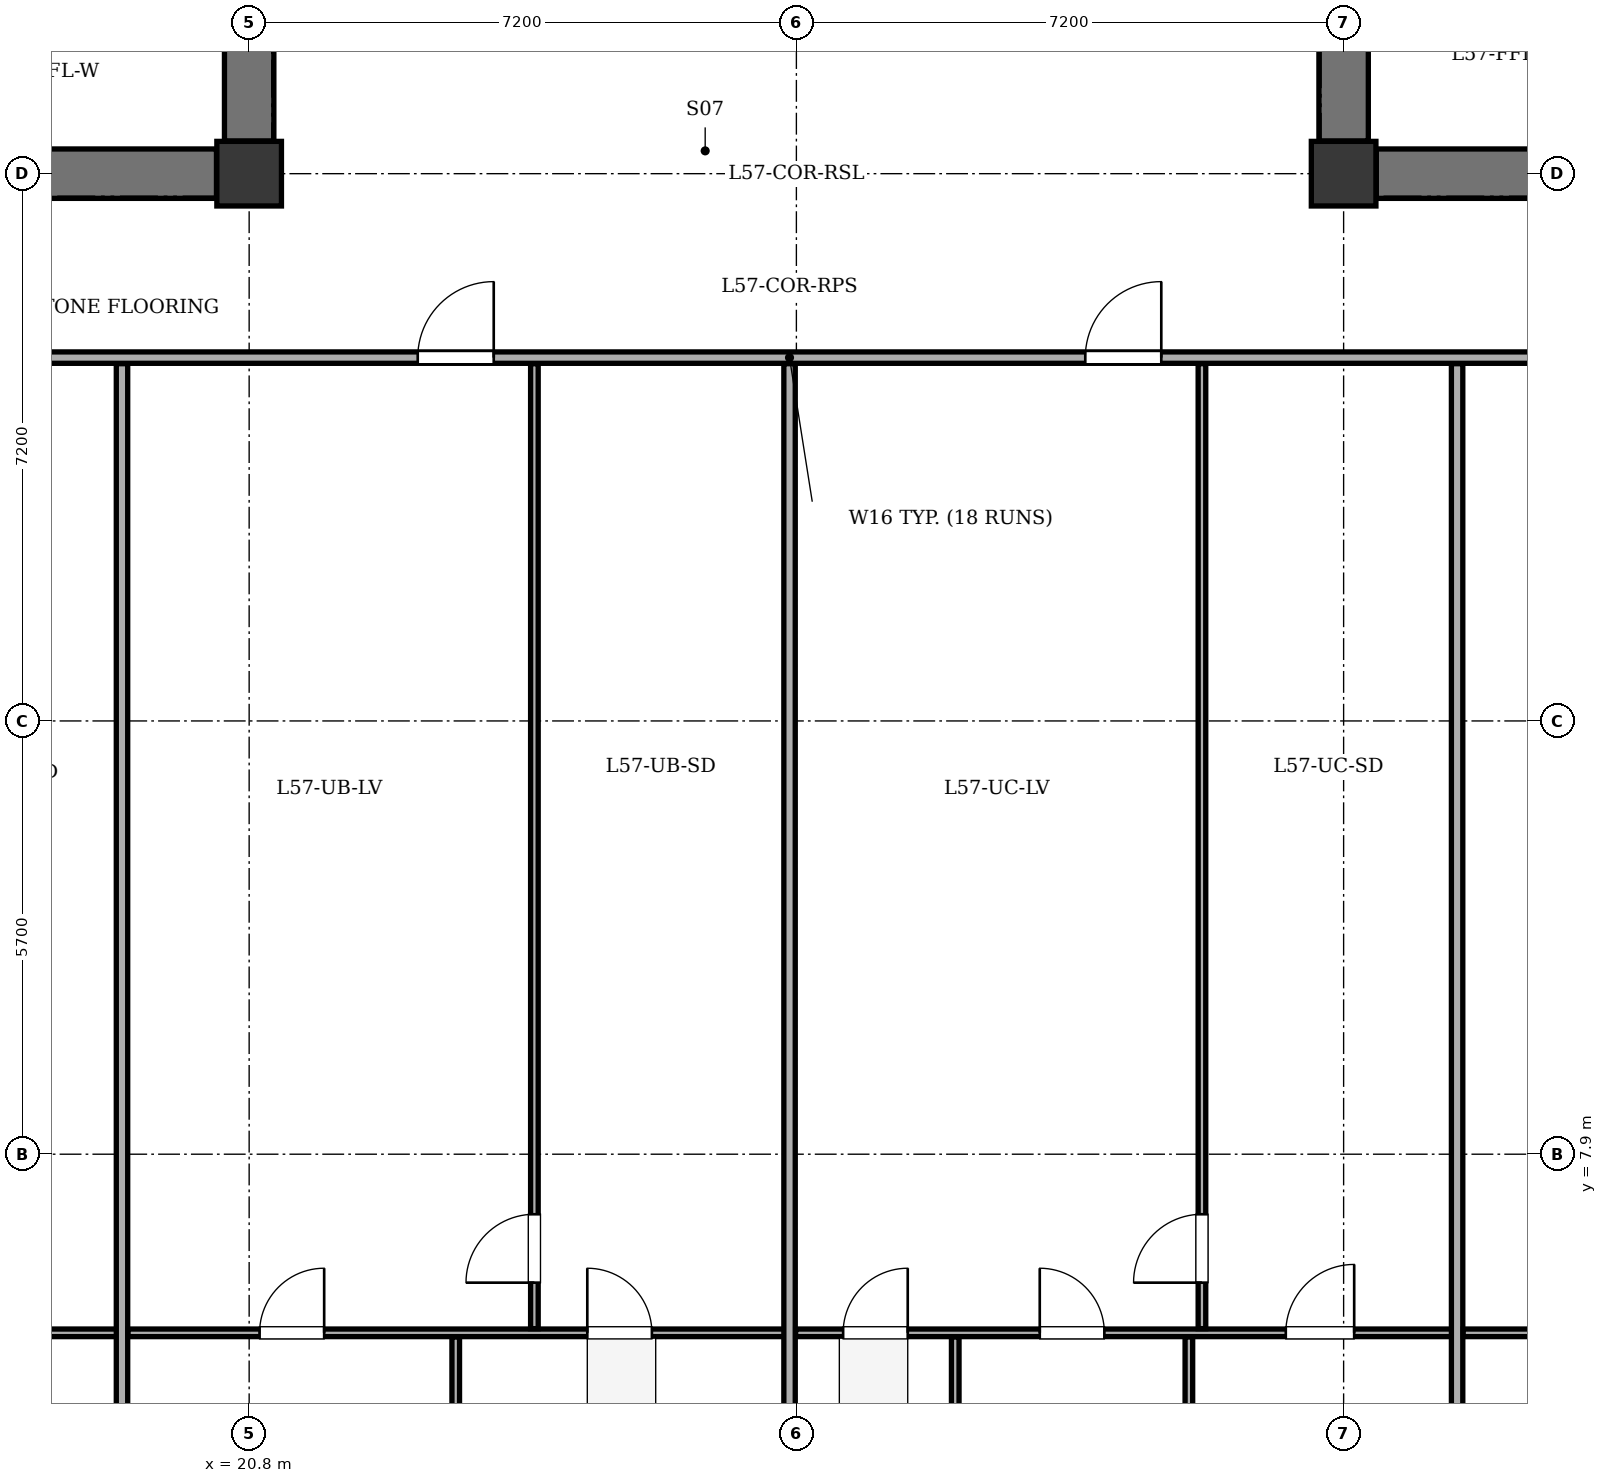
"""IFC4 building model, lengths in metres.
Left out: names, types, materials, properties, quantities, classifications, styles, units other than length and angle.
Written with IfcOpenShell. Run it as: python <this file> out.ifc"""

import sys

from ifc_helpers import new_model, si_unit, direction, frame, frame_2d, origin, origin_2d, place, context, subcontext, project, spatial, rectangle, extrude, element, fill, save


model = new_model("IFC4")
c1 = context("Model", 3, precision=1e-05, world=origin(), true_north=direction((0.0, 1.0)))
c2 = subcontext(c1, "Body", "Model", "MODEL_VIEW")
j1 = project(units=[si_unit("LENGTHUNIT", "METRE"), si_unit("PLANEANGLEUNIT", "RADIAN")], contexts=[c1])
p1 = place(None, origin())
s1 = spatial("IfcSite", under=j1, at=p1, CompositionType="ELEMENT")
p2 = place(p1, origin())
s2 = spatial("IfcBuilding", under=s1, at=p2, CompositionType="ELEMENT")
p3 = place(p2, frame((0.0, 0.0, 221.1)))
s3 = spatial("IfcBuildingStorey", under=s2, at=p3, CompositionType="ELEMENT", Elevation=221.1)
for number, where, z_axis, x_axis in (
    (1, (20.8, 20.8, 0.0), (0.0, 0.0, 1.0), (1.0, 0.0, 0.0)),
    (2, (35.2, 20.8, 0.0), (0.0, 0.0, 1.0), (1.0, 0.0, 0.0)),
):
    element("IfcColumn", number, at=place(p3, frame(where, z_axis=z_axis, x_axis=x_axis)), inside=s3, PredefinedType="COLUMN", context=c2, shape_type="SweptSolid", body=[
        extrude(rectangle(XDim=0.85, YDim=0.85, at=origin_2d()), origin(), (0.0, 0.0, 1.0), 3.4),
    ])
p4 = place(p3, frame((13.23, 20.8, 0.0), z_axis=(0.0, 0.0, 1.0), x_axis=(1.0, 0.0, 0.0)))
e3 = element("IfcWall", 3, at=p4, inside=s3, PredefinedType="SHEAR", context=c2, shape_type="SweptSolid", body=[
    extrude(rectangle(XDim=7.14, YDim=0.65, at=frame_2d((3.57, 0.0))), origin(), (0.0, 0.0, 1.0), 3.1),
])
p5 = place(p3, frame((20.8, 21.23, 0.0), z_axis=(0.0, 0.0, 1.0), x_axis=(0.0, 1.0, 0.0)))
e4 = element("IfcWall", 4, at=p5, inside=s3, PredefinedType="SHEAR", context=c2, shape_type="SweptSolid", body=[
    extrude(rectangle(XDim=3.82, YDim=0.65, at=frame_2d((1.91, 0.0))), origin(), (0.0, 0.0, 1.0), 3.1),
])
p6 = place(p5, frame((1.37, 0.0, 0.0)))
e5 = element("IfcOpeningElement", 5, at=p6, cuts=e4, PredefinedType="OPENING", context=c2, shape_type="SweptSolid", body=[
    extrude(rectangle(XDim=1.2, YDim=2.15, at=frame_2d((0.6, 1.075))), frame((0.0, 0.335, 0.0), z_axis=(0.0, -1.0, 0.0), x_axis=(1.0, 0.0, 0.0)), (0.0, 0.0, 1.0), 0.67),
])
p7 = place(p3, frame((35.63, 20.8, 0.0), z_axis=(0.0, 0.0, 1.0), x_axis=(1.0, 0.0, 0.0)))
e6 = element("IfcWall", 6, at=p7, inside=s3, PredefinedType="SHEAR", context=c2, shape_type="SweptSolid", body=[
    extrude(rectangle(XDim=7.14, YDim=0.65, at=frame_2d((3.57, 0.0))), origin(), (0.0, 0.0, 1.0), 3.1),
])
p8 = place(p3, frame((35.2, 21.23, 0.0), z_axis=(0.0, 0.0, 1.0), x_axis=(0.0, 1.0, 0.0)))
e7 = element("IfcWall", 7, at=p8, inside=s3, PredefinedType="SHEAR", context=c2, shape_type="SweptSolid", body=[
    extrude(rectangle(XDim=3.82, YDim=0.65, at=frame_2d((1.91, 0.0))), origin(), (0.0, 0.0, 1.0), 3.1),
])
p9 = place(p8, frame((1.37, 0.0, 0.0)))
e8 = element("IfcOpeningElement", 8, at=p9, cuts=e7, PredefinedType="OPENING", context=c2, shape_type="SweptSolid", body=[
    extrude(rectangle(XDim=1.2, YDim=2.15, at=frame_2d((0.6, 1.075))), frame((0.0, 0.335, 0.0), z_axis=(0.0, -1.0, 0.0), x_axis=(1.0, 0.0, 0.0)), (0.0, 0.0, 1.0), 0.67),
])
p10 = place(p3, frame((10.9, 18.38, 0.0), z_axis=(0.0, 0.0, 1.0), x_axis=(1.0, 0.0, 0.0)))
e9 = element("IfcWall", 9, at=p10, inside=s3, PredefinedType="PARTITIONING", context=c2, shape_type="SweptSolid", body=[
    extrude(rectangle(XDim=34.02, YDim=0.15, at=frame_2d((17.01, 0.0))), origin(), (0.0, 0.0, 1.0), 3.1),
])
p11 = place(p10, frame((3.674, 0.0, 0.0)))
e10 = element("IfcOpeningElement", 10, at=p11, cuts=e9, PredefinedType="OPENING", context=c2, shape_type="SweptSolid", body=[
    extrude(rectangle(XDim=1.0, YDim=2.1, at=frame_2d((0.5, 1.05))), frame((0.0, 0.085, 0.0), z_axis=(0.0, -1.0, 0.0), x_axis=(1.0, 0.0, 0.0)), (0.0, 0.0, 1.0), 0.17),
])
p12 = place(p10, frame((12.118, 0.0, 0.0)))
e11 = element("IfcOpeningElement", 11, at=p12, cuts=e9, PredefinedType="OPENING", context=c2, shape_type="SweptSolid", body=[
    extrude(rectangle(XDim=1.0, YDim=2.1, at=frame_2d((0.5, 1.05))), frame((0.0, 0.085, 0.0), z_axis=(0.0, -1.0, 0.0), x_axis=(1.0, 0.0, 0.0)), (0.0, 0.0, 1.0), 0.17),
])
p13 = place(p10, frame((20.901, 0.0, 0.0)))
e12 = element("IfcOpeningElement", 12, at=p13, cuts=e9, PredefinedType="OPENING", context=c2, shape_type="SweptSolid", body=[
    extrude(rectangle(XDim=1.0, YDim=2.1, at=frame_2d((0.5, 1.05))), frame((0.0, 0.085, 0.0), z_axis=(0.0, -1.0, 0.0), x_axis=(1.0, 0.0, 0.0)), (0.0, 0.0, 1.0), 0.17),
])
p14 = place(p10, frame((29.346, 0.0, 0.0)))
e13 = element("IfcOpeningElement", 13, at=p14, cuts=e9, PredefinedType="OPENING", context=c2, shape_type="SweptSolid", body=[
    extrude(rectangle(XDim=1.0, YDim=2.1, at=frame_2d((0.5, 1.05))), frame((0.0, 0.085, 0.0), z_axis=(0.0, -1.0, 0.0), x_axis=(1.0, 0.0, 0.0)), (0.0, 0.0, 1.0), 0.17),
])
p15 = place(p3, frame((11.1, 5.55, 0.0), z_axis=(0.0, 0.0, 1.0), x_axis=(1.0, 0.0, 0.0)))
e14 = element("IfcWall", 14, at=p15, inside=s3, PredefinedType="PARTITIONING", context=c2, shape_type="SweptSolid", body=[
    extrude(rectangle(XDim=8.067, YDim=0.1, at=frame_2d((4.033, 0.0))), origin(), (0.0, 0.0, 1.0), 3.1),
])
p16 = place(p15, frame((1.562, 0.0, 0.0)))
e15 = element("IfcOpeningElement", 15, at=p16, cuts=e14, PredefinedType="OPENING", context=c2, shape_type="SweptSolid", body=[
    extrude(rectangle(XDim=0.85, YDim=2.05, at=frame_2d((0.425, 1.025))), frame((0.0, 0.06, 0.0), z_axis=(0.0, -1.0, 0.0), x_axis=(1.0, 0.0, 0.0)), (0.0, 0.0, 1.0), 0.12),
])
p17 = place(p15, frame((5.535, 0.0, 0.0)))
e16 = element("IfcOpeningElement", 16, at=p17, cuts=e14, PredefinedType="OPENING", context=c2, shape_type="SweptSolid", body=[
    extrude(rectangle(XDim=0.85, YDim=2.05, at=frame_2d((0.425, 1.025))), frame((0.0, 0.06, 0.0), z_axis=(0.0, -1.0, 0.0), x_axis=(1.0, 0.0, 0.0)), (0.0, 0.0, 1.0), 0.12),
])
p18 = place(p3, frame((19.127, 3.045, 0.0), z_axis=(0.0, 0.0, 1.0), x_axis=(0.0, 1.0, 0.0)))
e17 = element("IfcWall", 17, at=p18, inside=s3, PredefinedType="PARTITIONING", context=c2, shape_type="SweptSolid", body=[
    extrude(rectangle(XDim=15.255, YDim=0.15, at=frame_2d((7.627, 0.0))), origin(), (0.0, 0.0, 1.0), 3.1),
])
p19 = place(p3, frame((19.207, 5.55, 0.0), z_axis=(0.0, 0.0, 1.0), x_axis=(1.0, 0.0, 0.0)))
e18 = element("IfcWall", 18, at=p19, inside=s3, PredefinedType="PARTITIONING", context=c2, shape_type="SweptSolid", body=[
    extrude(rectangle(XDim=8.743, YDim=0.1, at=frame_2d((4.372, 0.0))), origin(), (0.0, 0.0, 1.0), 3.1),
])
p20 = place(p19, frame((1.73, 0.0, 0.0)))
e19 = element("IfcOpeningElement", 19, at=p20, cuts=e18, PredefinedType="OPENING", context=c2, shape_type="SweptSolid", body=[
    extrude(rectangle(XDim=0.85, YDim=2.05, at=frame_2d((0.425, 1.025))), frame((0.0, 0.06, 0.0), z_axis=(0.0, -1.0, 0.0), x_axis=(1.0, 0.0, 0.0)), (0.0, 0.0, 1.0), 0.12),
])
p21 = place(p19, frame((6.042, 0.0, 0.0)))
e20 = element("IfcOpeningElement", 20, at=p21, cuts=e18, PredefinedType="OPENING", context=c2, shape_type="SweptSolid", body=[
    extrude(rectangle(XDim=0.85, YDim=2.05, at=frame_2d((0.425, 1.025))), frame((0.0, 0.06, 0.0), z_axis=(0.0, -1.0, 0.0), x_axis=(1.0, 0.0, 0.0)), (0.0, 0.0, 1.0), 0.12),
])
p22 = place(p3, frame((24.553, 5.605, 0.0), z_axis=(0.0, 0.0, 1.0), x_axis=(0.0, 1.0, 0.0)))
e21 = element("IfcWall", 21, at=p22, inside=s3, PredefinedType="PARTITIONING", context=c2, shape_type="SweptSolid", body=[
    extrude(rectangle(XDim=12.695, YDim=0.1, at=frame_2d((6.348, 0.0))), origin(), (0.0, 0.0, 1.0), 3.1),
])
p23 = place(p22, frame((0.605, 0.0, 0.0)))
e22 = element("IfcOpeningElement", 22, at=p23, cuts=e21, PredefinedType="OPENING", context=c2, shape_type="SweptSolid", body=[
    extrude(rectangle(XDim=0.9, YDim=2.05, at=frame_2d((0.45, 1.025))), frame((0.0, 0.06, 0.0), z_axis=(0.0, -1.0, 0.0), x_axis=(1.0, 0.0, 0.0)), (0.0, 0.0, 1.0), 0.12),
])
p24 = place(p3, frame((23.518, 3.045, 0.0), z_axis=(0.0, 0.0, 1.0), x_axis=(0.0, 1.0, 0.0)))
e23 = element("IfcWall", 23, at=p24, inside=s3, PredefinedType="PARTITIONING", context=c2, shape_type="SweptSolid", body=[
    extrude(rectangle(XDim=2.45, YDim=0.1, at=frame_2d((1.225, 0.0))), origin(), (0.0, 0.0, 1.0), 3.1),
])
p25 = place(p3, frame((27.91, 3.045, 0.0), z_axis=(0.0, 0.0, 1.0), x_axis=(0.0, 1.0, 0.0)))
e24 = element("IfcWall", 24, at=p25, inside=s3, PredefinedType="PARTITIONING", context=c2, shape_type="SweptSolid", body=[
    extrude(rectangle(XDim=15.255, YDim=0.15, at=frame_2d((7.627, 0.0))), origin(), (0.0, 0.0, 1.0), 2.535),
])
p26 = place(p3, frame((27.99, 5.55, 0.0), z_axis=(0.0, 0.0, 1.0), x_axis=(1.0, 0.0, 0.0)))
e25 = element("IfcWall", 25, at=p26, inside=s3, PredefinedType="PARTITIONING", context=c2, shape_type="SweptSolid", body=[
    extrude(rectangle(XDim=8.743, YDim=0.1, at=frame_2d((4.372, 0.0))), origin(), (0.0, 0.0, 1.0), 3.1),
])
p27 = place(p26, frame((0.625, 0.0, 0.0)))
e26 = element("IfcOpeningElement", 26, at=p27, cuts=e25, PredefinedType="OPENING", context=c2, shape_type="SweptSolid", body=[
    extrude(rectangle(XDim=0.85, YDim=2.05, at=frame_2d((0.425, 1.025))), frame((0.0, 0.06, 0.0), z_axis=(0.0, -1.0, 0.0), x_axis=(1.0, 0.0, 0.0)), (0.0, 0.0, 1.0), 0.12),
])
p28 = place(p26, frame((3.212, 0.0, 0.0)))
e27 = element("IfcOpeningElement", 27, at=p28, cuts=e25, PredefinedType="OPENING", context=c2, shape_type="SweptSolid", body=[
    extrude(rectangle(XDim=0.85, YDim=2.05, at=frame_2d((0.425, 1.025))), frame((0.0, 0.06, 0.0), z_axis=(0.0, -1.0, 0.0), x_axis=(1.0, 0.0, 0.0)), (0.0, 0.0, 1.0), 0.12),
])
p29 = place(p26, frame((6.449, 0.0, 0.0)))
e28 = element("IfcOpeningElement", 28, at=p29, cuts=e25, PredefinedType="OPENING", context=c2, shape_type="SweptSolid", body=[
    extrude(rectangle(XDim=0.9, YDim=2.05, at=frame_2d((0.45, 1.025))), frame((0.0, 0.06, 0.0), z_axis=(0.0, -1.0, 0.0), x_axis=(1.0, 0.0, 0.0)), (0.0, 0.0, 1.0), 0.12),
])
p30 = place(p3, frame((33.336, 5.605, 0.0), z_axis=(0.0, 0.0, 1.0), x_axis=(0.0, 1.0, 0.0)))
e29 = element("IfcWall", 29, at=p30, inside=s3, PredefinedType="PARTITIONING", context=c2, shape_type="SweptSolid", body=[
    extrude(rectangle(XDim=12.695, YDim=0.1, at=frame_2d((6.348, 0.0))), origin(), (0.0, 0.0, 1.0), 3.1),
])
p31 = place(p30, frame((0.605, 0.0, 0.0)))
e30 = element("IfcOpeningElement", 30, at=p31, cuts=e29, PredefinedType="OPENING", context=c2, shape_type="SweptSolid", body=[
    extrude(rectangle(XDim=0.9, YDim=2.05, at=frame_2d((0.45, 1.025))), frame((0.0, 0.06, 0.0), z_axis=(0.0, -1.0, 0.0), x_axis=(1.0, 0.0, 0.0)), (0.0, 0.0, 1.0), 0.12),
])
for number, where, z_axis, x_axis in (
    (31, (30.09, 3.045, 0.0), (0.0, 0.0, 1.0), (0.0, 1.0, 0.0)),
    (32, (33.164, 3.045, 0.0), (0.0, 0.0, 1.0), (0.0, 1.0, 0.0)),
):
    element("IfcWall", number, at=place(p3, frame(where, z_axis=z_axis, x_axis=x_axis)), inside=s3, PredefinedType="PARTITIONING", context=c2, shape_type="SweptSolid", body=[
        extrude(rectangle(XDim=2.45, YDim=0.1, at=frame_2d((1.225, 0.0))), origin(), (0.0, 0.0, 1.0), 3.1),
    ])
p32 = place(p3, frame((36.693, 3.045, 0.0), z_axis=(0.0, 0.0, 1.0), x_axis=(0.0, 1.0, 0.0)))
e33 = element("IfcWall", 33, at=p32, inside=s3, PredefinedType="PARTITIONING", context=c2, shape_type="SweptSolid", body=[
    extrude(rectangle(XDim=15.255, YDim=0.15, at=frame_2d((7.627, 0.0))), origin(), (0.0, 0.0, 1.0), 2.725),
])
p33 = place(p3, frame((36.773, 5.55, 0.0), z_axis=(0.0, 0.0, 1.0), x_axis=(1.0, 0.0, 0.0)))
e34 = element("IfcWall", 34, at=p33, inside=s3, PredefinedType="PARTITIONING", context=c2, shape_type="SweptSolid", body=[
    extrude(rectangle(XDim=8.067, YDim=0.1, at=frame_2d((4.034, 0.0))), origin(), (0.0, 0.0, 1.0), 3.1),
])
p34 = place(p33, frame((1.561, 0.0, 0.0)))
e35 = element("IfcOpeningElement", 35, at=p34, cuts=e34, PredefinedType="OPENING", context=c2, shape_type="SweptSolid", body=[
    extrude(rectangle(XDim=0.85, YDim=2.05, at=frame_2d((0.425, 1.025))), frame((0.0, 0.06, 0.0), z_axis=(0.0, -1.0, 0.0), x_axis=(1.0, 0.0, 0.0)), (0.0, 0.0, 1.0), 0.12),
])
p35 = place(p33, frame((5.535, 0.0, 0.0)))
e36 = element("IfcOpeningElement", 36, at=p35, cuts=e34, PredefinedType="OPENING", context=c2, shape_type="SweptSolid", body=[
    extrude(rectangle(XDim=0.85, YDim=2.05, at=frame_2d((0.425, 1.025))), frame((0.0, 0.06, 0.0), z_axis=(0.0, -1.0, 0.0), x_axis=(1.0, 0.0, 0.0)), (0.0, 0.0, 1.0), 0.12),
])
p36 = place(p12, origin())
e37 = element("IfcDoor", 37, at=p36, inside=s3, OperationType="SINGLE_SWING_RIGHT", PredefinedType="DOOR", context=c2, shape_type="SweptSolid", body=[
    extrude(rectangle(XDim=1.0, YDim=2.1, at=frame_2d((0.5, 1.05))), frame((0.0, 0.025, 0.0), z_axis=(0.0, -1.0, 0.0), x_axis=(1.0, 0.0, 0.0)), (0.0, 0.0, 1.0), 0.05),
])
fill(e11, e37)
p37 = place(p13, origin())
e38 = element("IfcDoor", 38, at=p37, inside=s3, OperationType="SINGLE_SWING_RIGHT", PredefinedType="DOOR", context=c2, shape_type="SweptSolid", body=[
    extrude(rectangle(XDim=1.0, YDim=2.1, at=frame_2d((0.5, 1.05))), frame((0.0, 0.025, 0.0), z_axis=(0.0, -1.0, 0.0), x_axis=(1.0, 0.0, 0.0)), (0.0, 0.0, 1.0), 0.05),
])
fill(e12, e38)
p38 = place(p23, origin())
e39 = element("IfcDoor", 39, at=p38, inside=s3, OperationType="SINGLE_SWING_LEFT", PredefinedType="DOOR", context=c2, shape_type="SweptSolid", body=[
    extrude(rectangle(XDim=0.9, YDim=2.05, at=frame_2d((0.45, 1.025))), frame((0.0, 0.025, 0.0), z_axis=(0.0, -1.0, 0.0), x_axis=(1.0, 0.0, 0.0)), (0.0, 0.0, 1.0), 0.05),
])
fill(e22, e39)
p39 = place(p20, origin())
e40 = element("IfcDoor", 40, at=p39, inside=s3, OperationType="SINGLE_SWING_RIGHT", PredefinedType="DOOR", context=c2, shape_type="SweptSolid", body=[
    extrude(rectangle(XDim=0.85, YDim=2.05, at=frame_2d((0.425, 1.025))), frame((0.0, 0.025, 0.0), z_axis=(0.0, -1.0, 0.0), x_axis=(1.0, 0.0, 0.0)), (0.0, 0.0, 1.0), 0.05),
])
fill(e19, e40)
p40 = place(p21, origin())
e41 = element("IfcDoor", 41, at=p40, inside=s3, OperationType="SINGLE_SWING_LEFT", PredefinedType="DOOR", context=c2, shape_type="SweptSolid", body=[
    extrude(rectangle(XDim=0.85, YDim=2.05, at=frame_2d((0.425, 1.025))), frame((0.0, 0.025, 0.0), z_axis=(0.0, -1.0, 0.0), x_axis=(1.0, 0.0, 0.0)), (0.0, 0.0, 1.0), 0.05),
])
fill(e20, e41)
p41 = place(p31, origin())
e42 = element("IfcDoor", 42, at=p41, inside=s3, OperationType="SINGLE_SWING_LEFT", PredefinedType="DOOR", context=c2, shape_type="SweptSolid", body=[
    extrude(rectangle(XDim=0.9, YDim=2.05, at=frame_2d((0.45, 1.025))), frame((0.0, 0.025, 0.0), z_axis=(0.0, -1.0, 0.0), x_axis=(1.0, 0.0, 0.0)), (0.0, 0.0, 1.0), 0.05),
])
fill(e30, e42)
p42 = place(p27, origin())
e43 = element("IfcDoor", 43, at=p42, inside=s3, OperationType="SINGLE_SWING_RIGHT", PredefinedType="DOOR", context=c2, shape_type="SweptSolid", body=[
    extrude(rectangle(XDim=0.85, YDim=2.05, at=frame_2d((0.425, 1.025))), frame((0.0, 0.025, 0.0), z_axis=(0.0, -1.0, 0.0), x_axis=(1.0, 0.0, 0.0)), (0.0, 0.0, 1.0), 0.05),
])
fill(e26, e43)
p43 = place(p28, origin())
e44 = element("IfcDoor", 44, at=p43, inside=s3, OperationType="SINGLE_SWING_LEFT", PredefinedType="DOOR", context=c2, shape_type="SweptSolid", body=[
    extrude(rectangle(XDim=0.85, YDim=2.05, at=frame_2d((0.425, 1.025))), frame((0.0, 0.025, 0.0), z_axis=(0.0, -1.0, 0.0), x_axis=(1.0, 0.0, 0.0)), (0.0, 0.0, 1.0), 0.05),
])
fill(e27, e44)
p44 = place(p29, origin())
e45 = element("IfcDoor", 45, at=p44, inside=s3, OperationType="SINGLE_SWING_RIGHT", PredefinedType="DOOR", context=c2, shape_type="SweptSolid", body=[
    extrude(rectangle(XDim=0.9, YDim=2.05, at=frame_2d((0.45, 1.025))), frame((0.0, 0.025, 0.0), z_axis=(0.0, -1.0, 0.0), x_axis=(1.0, 0.0, 0.0)), (0.0, 0.0, 1.0), 0.05),
])
fill(e28, e45)
save(model, sys.argv[1])
